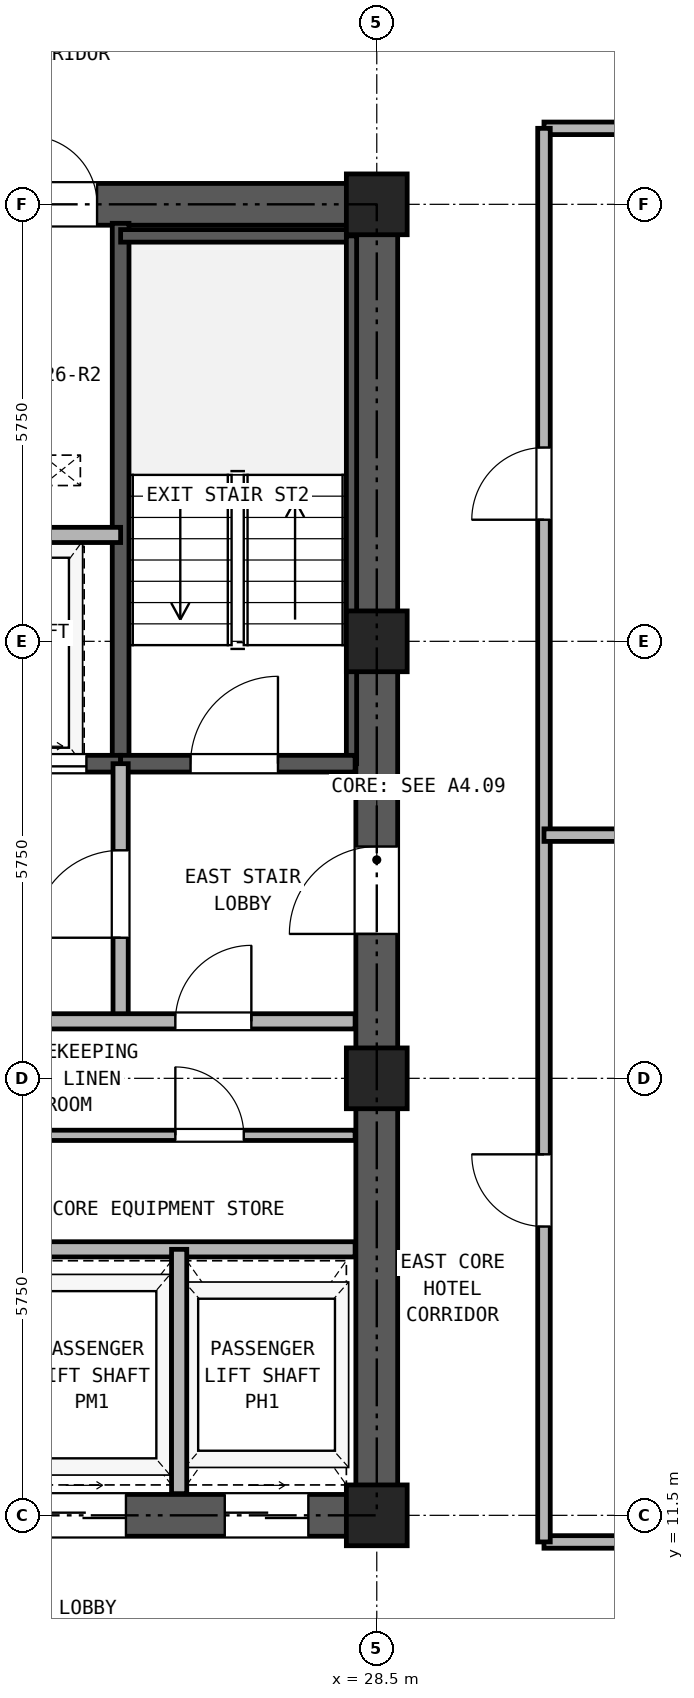
"""IFC4 building model, lengths in metres.
Left out: names, types, materials, properties, quantities, classifications, styles, units other than length and angle.
Written with IfcOpenShell. Run it as: python <this file> out.ifc"""

import sys

from ifc_helpers import new_model, si_unit, direction, frame, frame_2d, origin, origin_2d, place, context, subcontext, project, spatial, rectangle, hollow_rectangle, extrude, source, transform, mapped, element, fill, save


model = new_model("IFC4")
c1 = context("Model", 3, precision=1e-05, world=origin(), true_north=direction((0.0, 1.0)))
c2 = subcontext(c1, "Body", "Model", "MODEL_VIEW")
j1 = project(units=[si_unit("LENGTHUNIT", "METRE"), si_unit("PLANEANGLEUNIT", "RADIAN")], contexts=[c1])
p1 = place(None, origin())
s1 = spatial("IfcSite", under=j1, at=p1, CompositionType="ELEMENT")
p2 = place(p1, origin())
s2 = spatial("IfcBuilding", under=s1, at=p2, CompositionType="ELEMENT")
p3 = place(p2, frame((0.0, 0.0, 99.1)))
s3 = spatial("IfcBuildingStorey", under=s2, at=p3, CompositionType="ELEMENT", Elevation=99.1)
m1 = source(origin(), c2, "Body", "SweptSolid", [
    extrude(hollow_rectangle(XDim=0.8, YDim=0.8, WallThickness=0.045, at=origin_2d()), origin(), (0.0, 0.0, 1.0), 2.95),
])
for number, where, z_axis, x_axis in (
    (1, (28.5, 11.5, 0.0), (0.0, 0.0, 1.0), (1.0, 0.0, 0.0)),
    (2, (28.5, 17.25, 0.0), (0.0, 0.0, 1.0), (1.0, 0.0, 0.0)),
    (3, (28.5, 23.0, 0.0), (0.0, 0.0, 1.0), (1.0, 0.0, 0.0)),
    (4, (28.5, 28.75, 0.0), (0.0, 0.0, 1.0), (1.0, 0.0, 0.0)),
):
    element("IfcColumn", number, at=place(p3, frame(where, z_axis=z_axis, x_axis=x_axis)), inside=s3, PredefinedType="COLUMN", context=c2, shape_type="MappedRepresentation", body=[
        mapped(m1, transform((0.0, 0.0, 0.0), x_axis=(1.0, 0.0, 0.0), y_axis=(0.0, 1.0, 0.0), z_axis=(0.0, 0.0, 1.0), scale=1.0)),
    ])
p4 = place(p3, frame((18.225, 11.5, 0.0), z_axis=(0.0, 0.0, 1.0), x_axis=(1.0, 0.0, 0.0)))
e5 = element("IfcWall", 5, at=p4, inside=s3, PredefinedType="SHEAR", context=c2, shape_type="SweptSolid", body=[
    extrude(rectangle(XDim=10.55, YDim=0.55, at=frame_2d((5.275, 0.0))), origin(), (0.0, 0.0, 1.0), 2.95),
])
p5 = place(p4, frame((2.375, 0.0, 0.0)))
e6 = element("IfcOpeningElement", 6, at=p5, cuts=e5, PredefinedType="OPENING", context=c2, shape_type="SweptSolid", body=[
    extrude(rectangle(XDim=0.95, YDim=2.15, at=frame_2d((0.475, 1.075))), frame((0.0, 0.285, 0.0), z_axis=(0.0, -1.0, 0.0), x_axis=(1.0, 0.0, 0.0)), (0.0, 0.0, 1.0), 0.57),
])
p6 = place(p4, frame((5.875, 0.0, 0.0)))
e7 = element("IfcOpeningElement", 7, at=p6, cuts=e5, PredefinedType="OPENING", context=c2, shape_type="SweptSolid", body=[
    extrude(rectangle(XDim=1.1, YDim=2.25, at=frame_2d((0.55, 1.125))), frame((0.0, 0.285, 0.0), z_axis=(0.0, -1.0, 0.0), x_axis=(1.0, 0.0, 0.0)), (0.0, 0.0, 1.0), 0.57),
])
p7 = place(p4, frame((8.275, 0.0, 0.0)))
e8 = element("IfcOpeningElement", 8, at=p7, cuts=e5, PredefinedType="OPENING", context=c2, shape_type="SweptSolid", body=[
    extrude(rectangle(XDim=1.1, YDim=2.25, at=frame_2d((0.55, 1.125))), frame((0.0, 0.285, 0.0), z_axis=(0.0, -1.0, 0.0), x_axis=(1.0, 0.0, 0.0)), (0.0, 0.0, 1.0), 0.57),
])
p8 = place(p3, frame((18.225, 28.75, 0.0), z_axis=(0.0, 0.0, 1.0), x_axis=(1.0, 0.0, 0.0)))
e9 = element("IfcWall", 9, at=p8, inside=s3, PredefinedType="SHEAR", context=c2, shape_type="SweptSolid", body=[
    extrude(rectangle(XDim=10.55, YDim=0.55, at=frame_2d((5.275, 0.0))), origin(), (0.0, 0.0, 1.0), 2.95),
])
p9 = place(p8, frame((4.155, 0.0, 0.0)))
e10 = element("IfcOpeningElement", 10, at=p9, cuts=e9, PredefinedType="OPENING", context=c2, shape_type="SweptSolid", body=[
    extrude(rectangle(XDim=0.9, YDim=2.05, at=frame_2d((0.45, 1.025))), frame((0.0, 0.285, 0.0), z_axis=(0.0, -1.0, 0.0), x_axis=(1.0, 0.0, 0.0)), (0.0, 0.0, 1.0), 0.57),
])
p10 = place(p8, frame((5.695, 0.0, 0.0)))
e11 = element("IfcOpeningElement", 11, at=p10, cuts=e9, PredefinedType="OPENING", context=c2, shape_type="SweptSolid", body=[
    extrude(rectangle(XDim=0.9, YDim=2.05, at=frame_2d((0.45, 1.025))), frame((0.0, 0.285, 0.0), z_axis=(0.0, -1.0, 0.0), x_axis=(1.0, 0.0, 0.0)), (0.0, 0.0, 1.0), 0.57),
])
p11 = place(p3, frame((28.5, 11.775, 0.0), z_axis=(0.0, 0.0, 1.0), x_axis=(0.0, 1.0, 0.0)))
e12 = element("IfcWall", 12, at=p11, inside=s3, PredefinedType="SHEAR", context=c2, shape_type="SweptSolid", body=[
    extrude(rectangle(XDim=16.7, YDim=0.55, at=frame_2d((8.35, 0.0))), origin(), (0.0, 0.0, 1.0), 2.95),
])
p12 = place(p11, frame((7.375, 0.0, 0.0)))
e13 = element("IfcOpeningElement", 13, at=p12, cuts=e12, PredefinedType="OPENING", context=c2, shape_type="SweptSolid", body=[
    extrude(rectangle(XDim=1.15, YDim=2.2, at=frame_2d((0.575, 1.1))), frame((0.0, 0.285, 0.0), z_axis=(0.0, -1.0, 0.0), x_axis=(1.0, 0.0, 0.0)), (0.0, 0.0, 1.0), 0.57),
])
p13 = place(p3, frame((25.13, 21.39, 0.0), z_axis=(0.0, 0.0, 1.0), x_axis=(0.0, 1.0, 0.0)))
e14 = element("IfcWall", 14, at=p13, inside=s3, PredefinedType="SOLIDWALL", context=c2, shape_type="SweptSolid", body=[
    extrude(rectangle(XDim=7.11, YDim=0.22, at=frame_2d((3.555, 0.0))), origin(), (0.0, 0.0, 1.0), 2.95),
])
p14 = place(p3, frame((25.13, 28.335, 0.0), z_axis=(0.0, 0.0, 1.0), x_axis=(1.0, 0.0, 0.0)))
e15 = element("IfcWall", 15, at=p14, inside=s3, PredefinedType="PARTITIONING", context=c2, shape_type="SweptSolid", body=[
    extrude(rectangle(XDim=3.085, YDim=0.165, at=frame_2d((1.542, 0.0))), origin(), (0.0, 0.0, 1.0), 2.95),
])
p15 = place(p3, frame((28.167, 21.39, 0.0), z_axis=(0.0, 0.0, 1.0), x_axis=(0.0, 1.0, 0.0)))
e16 = element("IfcWall", 16, at=p15, inside=s3, PredefinedType="PARTITIONING", context=c2, shape_type="SweptSolid", body=[
    extrude(rectangle(XDim=6.945, YDim=0.135, at=frame_2d((3.473, 0.0))), origin(), (0.0, 0.0, 1.0), 2.95),
])
p16 = place(p3, frame((18.785, 21.39, 0.0), z_axis=(0.0, 0.0, 1.0), x_axis=(1.0, 0.0, 0.0)))
e17 = element("IfcWall", 17, at=p16, inside=s3, PredefinedType="SOLIDWALL", context=c2, shape_type="SweptSolid", body=[
    extrude(rectangle(XDim=6.345, YDim=0.22, at=frame_2d((3.172, 0.0))), origin(), (0.0, 0.0, 1.0), 2.95),
])
p17 = place(p16, frame((1.065, 0.0, 0.0)))
e18 = element("IfcOpeningElement", 18, at=p17, cuts=e17, PredefinedType="OPENING", context=c2, shape_type="SweptSolid", body=[
    extrude(rectangle(XDim=1.15, YDim=2.2, at=frame_2d((0.575, 1.1))), frame((0.0, 0.12, 0.0), z_axis=(0.0, -1.0, 0.0), x_axis=(1.0, 0.0, 0.0)), (0.0, 0.0, 1.0), 0.24),
])
p18 = place(p16, frame((4.795, 0.0, 0.0)))
e19 = element("IfcOpeningElement", 19, at=p18, cuts=e17, PredefinedType="OPENING", context=c2, shape_type="SweptSolid", body=[
    extrude(rectangle(XDim=1.1, YDim=2.25, at=frame_2d((0.55, 1.125))), frame((0.0, 0.12, 0.0), z_axis=(0.0, -1.0, 0.0), x_axis=(1.0, 0.0, 0.0)), (0.0, 0.0, 1.0), 0.24),
])
p19 = place(p3, frame((25.13, 21.39, 0.0), z_axis=(0.0, 0.0, 1.0), x_axis=(1.0, 0.0, 0.0)))
e20 = element("IfcWall", 20, at=p19, inside=s3, PredefinedType="SOLIDWALL", context=c2, shape_type="SweptSolid", body=[
    extrude(rectangle(XDim=3.085, YDim=0.22, at=frame_2d((1.542, 0.0))), origin(), (0.0, 0.0, 1.0), 2.95),
])
p20 = place(p19, frame((0.92, 0.0, 0.0)))
e21 = element("IfcOpeningElement", 21, at=p20, cuts=e20, PredefinedType="OPENING", context=c2, shape_type="SweptSolid", body=[
    extrude(rectangle(XDim=1.15, YDim=2.2, at=frame_2d((0.575, 1.1))), frame((0.0, 0.12, 0.0), z_axis=(0.0, -1.0, 0.0), x_axis=(1.0, 0.0, 0.0)), (0.0, 0.0, 1.0), 0.24),
])
p21 = place(p3, frame((22.11, 24.4, 0.0), z_axis=(0.0, 0.0, 1.0), x_axis=(1.0, 0.0, 0.0)))
e22 = element("IfcWall", 22, at=p21, inside=s3, PredefinedType="PARTITIONING", context=c2, shape_type="SweptSolid", body=[
    extrude(rectangle(XDim=3.02, YDim=0.2, at=frame_2d((1.51, 0.0))), origin(), (0.0, 0.0, 1.0), 2.95),
])
p22 = place(p3, frame((25.13, 18.0, 0.0), z_axis=(0.0, 0.0, 1.0), x_axis=(0.0, 1.0, 0.0)))
e23 = element("IfcWall", 23, at=p22, inside=s3, PredefinedType="PARTITIONING", context=c2, shape_type="SweptSolid", body=[
    extrude(rectangle(XDim=3.39, YDim=0.2, at=frame_2d((1.695, 0.0))), origin(), (0.0, 0.0, 1.0), 2.95),
])
p23 = place(p22, frame((1.1, 0.0, 0.0)))
e24 = element("IfcOpeningElement", 24, at=p23, cuts=e23, PredefinedType="OPENING", context=c2, shape_type="SweptSolid", body=[
    extrude(rectangle(XDim=1.15, YDim=2.2, at=frame_2d((0.575, 1.1))), frame((0.0, 0.11, 0.0), z_axis=(0.0, -1.0, 0.0), x_axis=(1.0, 0.0, 0.0)), (0.0, 0.0, 1.0), 0.22),
])
p24 = place(p3, frame((18.785, 18.0, 0.0), z_axis=(0.0, 0.0, 1.0), x_axis=(1.0, 0.0, 0.0)))
e25 = element("IfcWall", 25, at=p24, inside=s3, PredefinedType="PARTITIONING", context=c2, shape_type="SweptSolid", body=[
    extrude(rectangle(XDim=9.43, YDim=0.2, at=frame_2d((4.715, 0.0))), origin(), (0.0, 0.0, 1.0), 2.95),
])
p25 = place(p24, frame((0.465, 0.0, 0.0)))
e26 = element("IfcOpeningElement", 26, at=p25, cuts=e25, PredefinedType="OPENING", context=c2, shape_type="SweptSolid", body=[
    extrude(rectangle(XDim=1.3, YDim=2.3, at=frame_2d((0.65, 1.15))), frame((0.0, 0.11, 0.0), z_axis=(0.0, -1.0, 0.0), x_axis=(1.0, 0.0, 0.0)), (0.0, 0.0, 1.0), 0.22),
])
p26 = place(p24, frame((2.565, 0.0, 0.0)))
e27 = element("IfcOpeningElement", 27, at=p26, cuts=e25, PredefinedType="OPENING", context=c2, shape_type="SweptSolid", body=[
    extrude(rectangle(XDim=1.3, YDim=2.3, at=frame_2d((0.65, 1.15))), frame((0.0, 0.11, 0.0), z_axis=(0.0, -1.0, 0.0), x_axis=(1.0, 0.0, 0.0)), (0.0, 0.0, 1.0), 0.22),
])
p27 = place(p24, frame((7.065, 0.0, 0.0)))
e28 = element("IfcOpeningElement", 28, at=p27, cuts=e25, PredefinedType="OPENING", context=c2, shape_type="SweptSolid", body=[
    extrude(rectangle(XDim=1.0, YDim=2.15, at=frame_2d((0.5, 1.075))), frame((0.0, 0.11, 0.0), z_axis=(0.0, -1.0, 0.0), x_axis=(1.0, 0.0, 0.0)), (0.0, 0.0, 1.0), 0.22),
])
p28 = place(p3, frame((18.785, 15.0, 0.0), z_axis=(0.0, 0.0, 1.0), x_axis=(1.0, 0.0, 0.0)))
e29 = element("IfcWall", 29, at=p28, inside=s3, PredefinedType="PARTITIONING", context=c2, shape_type="SweptSolid", body=[
    extrude(rectangle(XDim=9.43, YDim=0.2, at=frame_2d((4.715, 0.0))), origin(), (0.0, 0.0, 1.0), 2.95),
])
p29 = place(p3, frame((23.3, 16.5, 0.0), z_axis=(0.0, 0.0, 1.0), x_axis=(1.0, 0.0, 0.0)))
e30 = element("IfcWall", 30, at=p29, inside=s3, PredefinedType="PARTITIONING", context=c2, shape_type="SweptSolid", body=[
    extrude(rectangle(XDim=4.915, YDim=0.135, at=frame_2d((2.458, 0.0))), origin(), (0.0, 0.0, 1.0), 2.95),
])
p30 = place(p29, frame((2.55, 0.0, 0.0)))
e31 = element("IfcOpeningElement", 31, at=p30, cuts=e30, PredefinedType="OPENING", context=c2, shape_type="SweptSolid", body=[
    extrude(rectangle(XDim=0.9, YDim=2.05, at=frame_2d((0.45, 1.025))), frame((0.0, 0.077, 0.0), z_axis=(0.0, -1.0, 0.0), x_axis=(1.0, 0.0, 0.0)), (0.0, 0.0, 1.0), 0.155),
])
p31 = place(p3, frame((25.9, 11.785, 0.0), z_axis=(0.0, 0.0, 1.0), x_axis=(0.0, 1.0, 0.0)))
e32 = element("IfcWall", 32, at=p31, inside=s3, PredefinedType="PARTITIONING", context=c2, shape_type="SweptSolid", body=[
    extrude(rectangle(XDim=3.215, YDim=0.2, at=frame_2d((1.607, 0.0))), origin(), (0.0, 0.0, 1.0), 2.95),
])
for number, where, z_axis, x_axis in (
    (33, (30.7, 11.15, 0.0), (0.0, 0.0, 1.0), (1.0, 0.0, 0.0)),
    (34, (30.7, 29.75, 0.0), (0.0, 0.0, 1.0), (1.0, 0.0, 0.0)),
):
    element("IfcWall", number, at=place(p3, frame(where, z_axis=z_axis, x_axis=x_axis)), inside=s3, PredefinedType="PARTITIONING", context=c2, shape_type="SweptSolid", body=[
        extrude(rectangle(XDim=7.1, YDim=0.165, at=frame_2d((3.55, 0.0))), origin(), (0.0, 0.0, 1.0), 2.95),
    ])
p32 = place(p3, frame((30.7, 11.15, 0.0), z_axis=(0.0, 0.0, 1.0), x_axis=(0.0, 1.0, 0.0)))
e35 = element("IfcWall", 35, at=p32, inside=s3, PredefinedType="PARTITIONING", context=c2, shape_type="SweptSolid", body=[
    extrude(rectangle(XDim=18.6, YDim=0.165, at=frame_2d((9.3, 0.0))), origin(), (0.0, 0.0, 1.0), 2.95),
])
p33 = place(p32, frame((4.15, 0.0, 0.0)))
e36 = element("IfcOpeningElement", 36, at=p33, cuts=e35, PredefinedType="OPENING", context=c2, shape_type="SweptSolid", body=[
    extrude(rectangle(XDim=0.95, YDim=2.15, at=frame_2d((0.475, 1.075))), frame((0.0, 0.093, 0.0), z_axis=(0.0, -1.0, 0.0), x_axis=(1.0, 0.0, 0.0)), (0.0, 0.0, 1.0), 0.185),
])
p34 = place(p32, frame((13.45, 0.0, 0.0)))
e37 = element("IfcOpeningElement", 37, at=p34, cuts=e35, PredefinedType="OPENING", context=c2, shape_type="SweptSolid", body=[
    extrude(rectangle(XDim=0.95, YDim=2.15, at=frame_2d((0.475, 1.075))), frame((0.0, 0.093, 0.0), z_axis=(0.0, -1.0, 0.0), x_axis=(1.0, 0.0, 0.0)), (0.0, 0.0, 1.0), 0.185),
])
p35 = place(p3, frame((30.7, 20.45, 0.0), z_axis=(0.0, 0.0, 1.0), x_axis=(1.0, 0.0, 0.0)))
e38 = element("IfcWall", 38, at=p35, inside=s3, PredefinedType="PARTITIONING", context=c2, shape_type="SweptSolid", body=[
    extrude(rectangle(XDim=16.14, YDim=0.165, at=frame_2d((8.07, 0.0))), origin(), (0.0, 0.0, 1.0), 2.95),
])
p36 = place(p20, frame((1.15, 0.0, 0.0), z_axis=(0.0, 0.0, 1.0), x_axis=(-1.0, 0.0, 0.0)))
e39 = element("IfcDoor", 39, at=p36, inside=s3, OperationType="SINGLE_SWING_RIGHT", PredefinedType="DOOR", context=c2, shape_type="SweptSolid", body=[
    extrude(rectangle(XDim=1.15, YDim=2.2, at=frame_2d((0.575, 1.1))), frame((0.0, 0.025, 0.0), z_axis=(0.0, -1.0, 0.0), x_axis=(1.0, 0.0, 0.0)), (0.0, 0.0, 1.0), 0.05),
])
fill(e21, e39)
p37 = place(p18, frame((1.1, 0.0, 0.0), z_axis=(0.0, 0.0, 1.0), x_axis=(-1.0, 0.0, 0.0)))
e40 = element("IfcDoor", 40, at=p37, inside=s3, OperationType="DOUBLE_DOOR_SLIDING", PredefinedType="DOOR", context=c2, shape_type="SweptSolid", body=[
    extrude(rectangle(XDim=1.1, YDim=2.25, at=frame_2d((0.55, 1.125))), frame((0.0, 0.025, 0.0), z_axis=(0.0, -1.0, 0.0), x_axis=(1.0, 0.0, 0.0)), (0.0, 0.0, 1.0), 0.05),
])
fill(e19, e40)
p38 = place(p23, origin())
e41 = element("IfcDoor", 41, at=p38, inside=s3, OperationType="SINGLE_SWING_LEFT", PredefinedType="DOOR", context=c2, shape_type="SweptSolid", body=[
    extrude(rectangle(XDim=1.15, YDim=2.2, at=frame_2d((0.575, 1.1))), frame((0.0, 0.025, 0.0), z_axis=(0.0, -1.0, 0.0), x_axis=(1.0, 0.0, 0.0)), (0.0, 0.0, 1.0), 0.05),
])
fill(e24, e41)
p39 = place(p27, frame((1.0, 0.0, 0.0), z_axis=(0.0, 0.0, 1.0), x_axis=(-1.0, 0.0, 0.0)))
e42 = element("IfcDoor", 42, at=p39, inside=s3, OperationType="SINGLE_SWING_RIGHT", PredefinedType="DOOR", context=c2, shape_type="SweptSolid", body=[
    extrude(rectangle(XDim=1.0, YDim=2.15, at=frame_2d((0.5, 1.075))), frame((0.0, 0.025, 0.0), z_axis=(0.0, -1.0, 0.0), x_axis=(1.0, 0.0, 0.0)), (0.0, 0.0, 1.0), 0.05),
])
fill(e28, e42)
p40 = place(p30, frame((0.9, 0.0, 0.0), z_axis=(0.0, 0.0, 1.0), x_axis=(-1.0, 0.0, 0.0)))
e43 = element("IfcDoor", 43, at=p40, inside=s3, OperationType="SINGLE_SWING_LEFT", PredefinedType="DOOR", context=c2, shape_type="SweptSolid", body=[
    extrude(rectangle(XDim=0.9, YDim=2.05, at=frame_2d((0.45, 1.025))), frame((0.0, 0.025, 0.0), z_axis=(0.0, -1.0, 0.0), x_axis=(1.0, 0.0, 0.0)), (0.0, 0.0, 1.0), 0.05),
])
fill(e31, e43)
p41 = place(p12, origin())
e44 = element("IfcDoor", 44, at=p41, inside=s3, OperationType="SINGLE_SWING_LEFT", PredefinedType="DOOR", context=c2, shape_type="SweptSolid", body=[
    extrude(rectangle(XDim=1.15, YDim=2.2, at=frame_2d((0.575, 1.1))), frame((0.0, 0.025, 0.0), z_axis=(0.0, -1.0, 0.0), x_axis=(1.0, 0.0, 0.0)), (0.0, 0.0, 1.0), 0.05),
])
fill(e13, e44)
p42 = place(p10, origin())
e45 = element("IfcDoor", 45, at=p42, inside=s3, OperationType="SINGLE_SWING_LEFT", PredefinedType="DOOR", context=c2, shape_type="SweptSolid", body=[
    extrude(rectangle(XDim=0.9, YDim=2.05, at=frame_2d((0.45, 1.025))), frame((0.0, 0.025, 0.0), z_axis=(0.0, -1.0, 0.0), x_axis=(1.0, 0.0, 0.0)), (0.0, 0.0, 1.0), 0.05),
])
fill(e11, e45)
p43 = place(p6, frame((1.1, 0.0, 0.0), z_axis=(0.0, 0.0, 1.0), x_axis=(-1.0, 0.0, 0.0)))
e46 = element("IfcDoor", 46, at=p43, inside=s3, OperationType="DOUBLE_DOOR_SLIDING", PredefinedType="DOOR", context=c2, shape_type="SweptSolid", body=[
    extrude(rectangle(XDim=1.1, YDim=2.25, at=frame_2d((0.55, 1.125))), frame((0.0, 0.025, 0.0), z_axis=(0.0, -1.0, 0.0), x_axis=(1.0, 0.0, 0.0)), (0.0, 0.0, 1.0), 0.05),
])
fill(e7, e46)
p44 = place(p7, frame((1.1, 0.0, 0.0), z_axis=(0.0, 0.0, 1.0), x_axis=(-1.0, 0.0, 0.0)))
e47 = element("IfcDoor", 47, at=p44, inside=s3, OperationType="DOUBLE_DOOR_SLIDING", PredefinedType="DOOR", context=c2, shape_type="SweptSolid", body=[
    extrude(rectangle(XDim=1.1, YDim=2.25, at=frame_2d((0.55, 1.125))), frame((0.0, 0.025, 0.0), z_axis=(0.0, -1.0, 0.0), x_axis=(1.0, 0.0, 0.0)), (0.0, 0.0, 1.0), 0.05),
])
fill(e8, e47)
p45 = place(p33, origin())
e48 = element("IfcDoor", 48, at=p45, inside=s3, OperationType="SINGLE_SWING_RIGHT", PredefinedType="DOOR", context=c2, shape_type="SweptSolid", body=[
    extrude(rectangle(XDim=0.95, YDim=2.15, at=frame_2d((0.475, 1.075))), frame((0.0, 0.025, 0.0), z_axis=(0.0, -1.0, 0.0), x_axis=(1.0, 0.0, 0.0)), (0.0, 0.0, 1.0), 0.05),
])
fill(e36, e48)
p46 = place(p34, origin())
e49 = element("IfcDoor", 49, at=p46, inside=s3, OperationType="SINGLE_SWING_LEFT", PredefinedType="DOOR", context=c2, shape_type="SweptSolid", body=[
    extrude(rectangle(XDim=0.95, YDim=2.15, at=frame_2d((0.475, 1.075))), frame((0.0, 0.025, 0.0), z_axis=(0.0, -1.0, 0.0), x_axis=(1.0, 0.0, 0.0)), (0.0, 0.0, 1.0), 0.05),
])
fill(e37, e49)
save(model, sys.argv[1])
